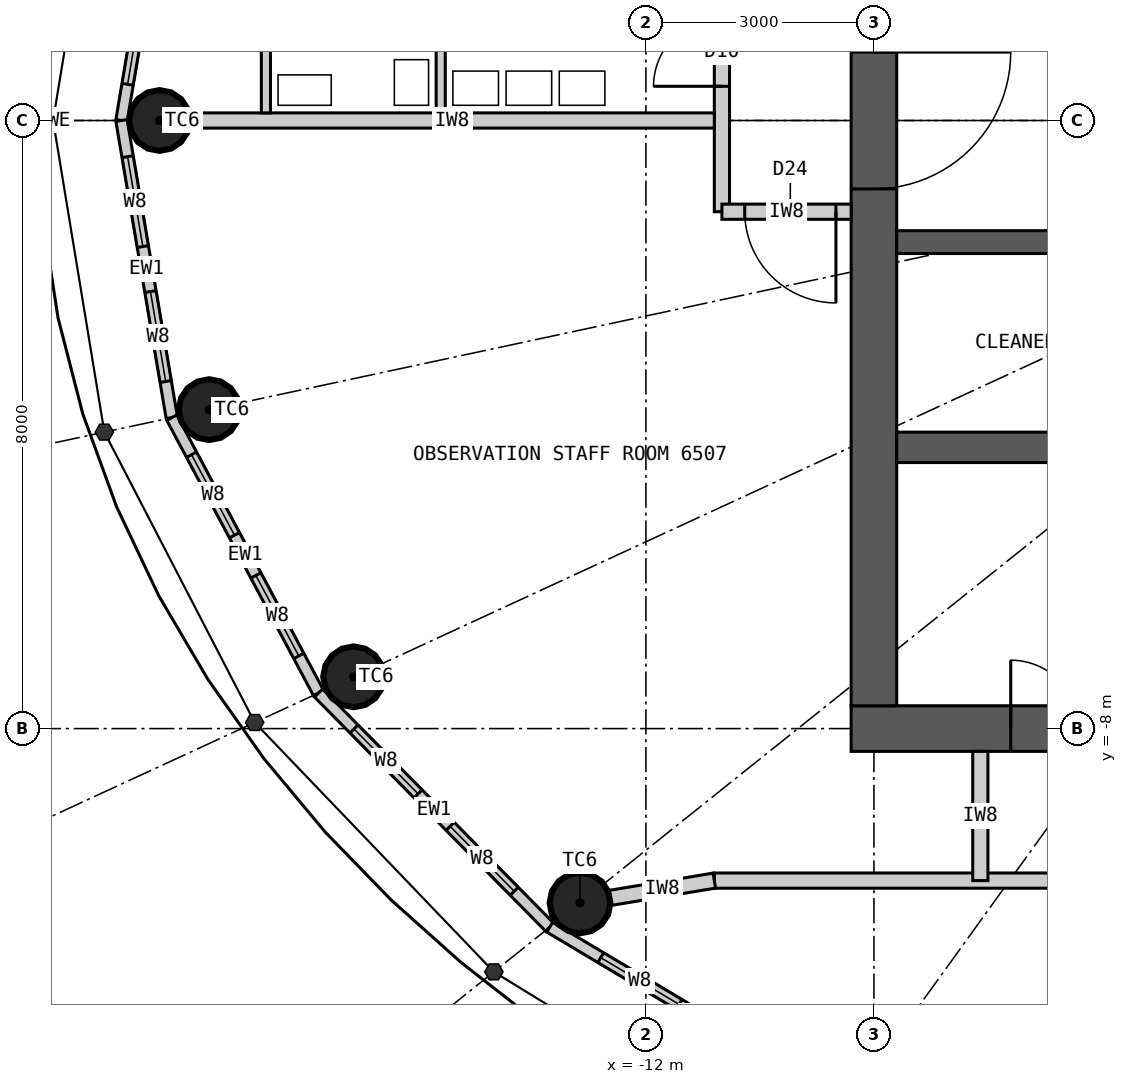
"""IFC4 building model, lengths in metres.
Left out: names, types, materials, properties, quantities, classifications, styles, units other than length and angle.
Written with IfcOpenShell. Run it as: python <this file> out.ifc"""

import sys

from ifc_helpers import new_model, si_unit, direction, frame, frame_2d, origin, origin_2d, place, context, subcontext, project, spatial, rectangle, circle, extrude, element, fill, save


model = new_model("IFC4")
c1 = context("Model", 3, precision=1e-05, world=origin(), true_north=direction((0.0, 1.0)))
c2 = subcontext(c1, "Body", "Model", "MODEL_VIEW")
j1 = project(units=[si_unit("LENGTHUNIT", "METRE"), si_unit("PLANEANGLEUNIT", "RADIAN")], contexts=[c1])
p1 = place(None, origin())
s1 = spatial("IfcSite", under=j1, at=p1, CompositionType="ELEMENT")
p2 = place(p1, origin())
s2 = spatial("IfcBuilding", under=s1, at=p2, CompositionType="ELEMENT")
p3 = place(p2, frame((0.0, 0.0, 242.7)))
s3 = spatial("IfcBuildingStorey", under=s2, at=p3, CompositionType="ELEMENT", Elevation=242.7)
for number, where, z_axis, x_axis in (
    (1, (-18.4, 0.0, 0.0), (0.0, 0.0, 1.0), (1.0, 0.0, 0.0)),
    (2, (-17.746, -3.804, 0.0), (0.0, 0.0, 1.0), (1.0, 0.0, 0.0)),
    (3, (-15.846, -7.319, 0.0), (0.0, 0.0, 1.0), (1.0, 0.0, 0.0)),
    (4, (-12.867, -10.294, 0.0), (0.0, 0.0, 1.0), (1.0, 0.0, 0.0)),
):
    element("IfcColumn", number, at=place(p3, frame(where, z_axis=z_axis, x_axis=x_axis)), inside=s3, PredefinedType="COLUMN", context=c2, shape_type="SweptSolid", body=[
        extrude(circle(Radius=0.4, at=origin_2d()), origin(), (0.0, 0.0, 1.0), 6.0),
    ])
p4 = place(p3, frame((9.3, -8.0, 0.0), z_axis=(0.0, 0.0, 1.0), x_axis=(-1.0, 0.0, 0.0)))
e5 = element("IfcWall", 5, at=p4, inside=s3, PredefinedType="SHEAR", context=c2, shape_type="SweptSolid", body=[
    extrude(rectangle(XDim=18.6, YDim=0.6, at=frame_2d((9.3, 0.0))), origin(), (0.0, 0.0, 1.0), 6.0),
])
p5 = place(p4, frame((8.0, 0.0, 0.0)))
e6 = element("IfcOpeningElement", 6, at=p5, cuts=e5, PredefinedType="OPENING", context=c2, shape_type="SweptSolid", body=[
    extrude(rectangle(XDim=1.2, YDim=2.2, at=frame_2d((0.6, 1.1))), frame((0.0, 0.31, 0.0), z_axis=(0.0, -1.0, 0.0), x_axis=(1.0, 0.0, 0.0)), (0.0, 0.0, 1.0), 0.62),
])
p6 = place(p4, frame((15.6, 0.0, 0.0)))
e7 = element("IfcOpeningElement", 7, at=p6, cuts=e5, PredefinedType="OPENING", context=c2, shape_type="SweptSolid", body=[
    extrude(rectangle(XDim=0.9, YDim=2.2, at=frame_2d((0.45, 1.1))), frame((0.0, 0.31, 0.0), z_axis=(0.0, -1.0, 0.0), x_axis=(1.0, 0.0, 0.0)), (0.0, 0.0, 1.0), 0.62),
])
p7 = place(p3, frame((-9.0, 7.7, 0.0), z_axis=(0.0, 0.0, 1.0), x_axis=(0.0, -1.0, 0.0)))
e8 = element("IfcWall", 8, at=p7, inside=s3, PredefinedType="SHEAR", context=c2, shape_type="SweptSolid", body=[
    extrude(rectangle(XDim=15.4, YDim=0.6, at=frame_2d((7.7, 0.0))), origin(), (0.0, 0.0, 1.0), 6.0),
])
p8 = place(p7, frame((6.8, 0.0, 0.0)))
e9 = element("IfcOpeningElement", 9, at=p8, cuts=e8, PredefinedType="OPENING", context=c2, shape_type="SweptSolid", body=[
    extrude(rectangle(XDim=1.8, YDim=2.2, at=frame_2d((0.9, 1.1))), frame((0.0, 0.31, 0.0), z_axis=(0.0, -1.0, 0.0), x_axis=(1.0, 0.0, 0.0)), (0.0, 0.0, 1.0), 0.62),
])
p9 = place(p3, frame((-8.7, -4.3, 0.0), z_axis=(0.0, 0.0, 1.0), x_axis=(1.0, 0.0, 0.0)))
e10 = element("IfcWall", 10, at=p9, inside=s3, PredefinedType="SHEAR", context=c2, shape_type="SweptSolid", body=[
    extrude(rectangle(XDim=17.4, YDim=0.4, at=frame_2d((8.7, 0.0))), origin(), (0.0, 0.0, 1.0), 6.0),
])
p10 = place(p3, frame((-8.7, -1.6, 0.0), z_axis=(0.0, 0.0, 1.0), x_axis=(1.0, 0.0, 0.0)))
e11 = element("IfcWall", 11, at=p10, inside=s3, PredefinedType="SHEAR", context=c2, shape_type="SweptSolid", body=[
    extrude(rectangle(XDim=17.4, YDim=0.3, at=frame_2d((8.7, 0.0))), origin(), (0.0, 0.0, 1.0), 6.0),
])
p11 = place(p10, frame((12.4, 0.0, 0.0)))
e12 = element("IfcOpeningElement", 12, at=p11, cuts=e11, PredefinedType="OPENING", context=c2, shape_type="SweptSolid", body=[
    extrude(rectangle(XDim=1.6, YDim=2.4, at=frame_2d((0.8, 1.2))), frame((0.0, 0.16, 0.0), z_axis=(0.0, -1.0, 0.0), x_axis=(1.0, 0.0, 0.0)), (0.0, 0.0, 1.0), 0.32),
])
p12 = place(p10, frame((15.5, 0.0, 0.0)))
e13 = element("IfcOpeningElement", 13, at=p12, cuts=e11, PredefinedType="OPENING", context=c2, shape_type="SweptSolid", body=[
    extrude(rectangle(XDim=1.4, YDim=2.4, at=frame_2d((0.7, 1.2))), frame((0.0, 0.16, 0.0), z_axis=(0.0, -1.0, 0.0), x_axis=(1.0, 0.0, 0.0)), (0.0, 0.0, 1.0), 0.32),
])
p13 = place(p10, frame((2.25, 0.0, 0.0)))
e14 = element("IfcOpeningElement", 14, at=p13, cuts=e11, PredefinedType="OPENING", context=c2, shape_type="SweptSolid", body=[
    extrude(rectangle(XDim=0.9, YDim=2.2, at=frame_2d((0.45, 1.1))), frame((0.0, 0.16, 0.0), z_axis=(0.0, -1.0, 0.0), x_axis=(1.0, 0.0, 0.0)), (0.0, 0.0, 1.0), 0.32),
])
p14 = place(p10, frame((8.25, 0.0, 0.0)))
e15 = element("IfcOpeningElement", 15, at=p14, cuts=e11, PredefinedType="OPENING", context=c2, shape_type="SweptSolid", body=[
    extrude(rectangle(XDim=0.9, YDim=2.2, at=frame_2d((0.45, 1.1))), frame((0.0, 0.16, 0.0), z_axis=(0.0, -1.0, 0.0), x_axis=(1.0, 0.0, 0.0)), (0.0, 0.0, 1.0), 0.32),
])
p15 = place(p3, frame((-18.238, 3.909, 0.0), z_axis=(0.0, 0.0, 1.0), x_axis=(-0.166984464914, -0.985959526795, 0.0)))
e16 = element("IfcWall", 16, at=p15, inside=s3, PredefinedType="ELEMENTEDWALL", context=c2, shape_type="SweptSolid", body=[
    extrude(rectangle(XDim=3.965, YDim=0.15, at=frame_2d((1.982, 0.0))), origin(), (0.0, 0.0, 1.0), 5.7),
])
p16 = place(p15, frame((0.483, 0.0, 0.5)))
e17 = element("IfcOpeningElement", 17, at=p16, cuts=e16, PredefinedType="OPENING", context=c2, shape_type="SweptSolid", body=[
    extrude(rectangle(XDim=1.2, YDim=4.2, at=frame_2d((0.6, 2.1))), frame((0.0, 0.085, 0.0), z_axis=(0.0, -1.0, 0.0), x_axis=(1.0, 0.0, 0.0)), (0.0, 0.0, 1.0), 0.17),
])
p17 = place(p15, frame((2.282, 0.0, 0.5)))
e18 = element("IfcOpeningElement", 18, at=p17, cuts=e16, PredefinedType="OPENING", context=c2, shape_type="SweptSolid", body=[
    extrude(rectangle(XDim=1.2, YDim=4.2, at=frame_2d((0.6, 2.1))), frame((0.0, 0.085, 0.0), z_axis=(0.0, -1.0, 0.0), x_axis=(1.0, 0.0, 0.0)), (0.0, 0.0, 1.0), 0.17),
])
p18 = place(p3, frame((-18.9, 0.0, 0.0), z_axis=(0.0, 0.0, 1.0), x_axis=(0.166984464914, -0.985959526795, 0.0)))
e19 = element("IfcWall", 19, at=p18, inside=s3, PredefinedType="ELEMENTEDWALL", context=c2, shape_type="SweptSolid", body=[
    extrude(rectangle(XDim=3.965, YDim=0.15, at=frame_2d((1.982, 0.0))), origin(), (0.0, 0.0, 1.0), 5.7),
])
p19 = place(p18, frame((0.483, 0.0, 0.5)))
e20 = element("IfcOpeningElement", 20, at=p19, cuts=e19, PredefinedType="OPENING", context=c2, shape_type="SweptSolid", body=[
    extrude(rectangle(XDim=1.2, YDim=4.2, at=frame_2d((0.6, 2.1))), frame((0.0, 0.085, 0.0), z_axis=(0.0, -1.0, 0.0), x_axis=(1.0, 0.0, 0.0)), (0.0, 0.0, 1.0), 0.17),
])
p20 = place(p18, frame((2.282, 0.0, 0.5)))
e21 = element("IfcOpeningElement", 21, at=p20, cuts=e19, PredefinedType="OPENING", context=c2, shape_type="SweptSolid", body=[
    extrude(rectangle(XDim=1.2, YDim=4.2, at=frame_2d((0.6, 2.1))), frame((0.0, 0.085, 0.0), z_axis=(0.0, -1.0, 0.0), x_axis=(1.0, 0.0, 0.0)), (0.0, 0.0, 1.0), 0.17),
])
p21 = place(p3, frame((-18.238, -3.909, 0.0), z_axis=(0.0, 0.0, 1.0), x_axis=(0.470282591286, -0.882515883332, 0.0)))
e22 = element("IfcWall", 22, at=p21, inside=s3, PredefinedType="ELEMENTEDWALL", context=c2, shape_type="SweptSolid", body=[
    extrude(rectangle(XDim=4.105, YDim=0.15, at=frame_2d((2.052, 0.0))), origin(), (0.0, 0.0, 1.0), 5.7),
])
p22 = place(p21, frame((0.552, 0.0, 0.5)))
e23 = element("IfcOpeningElement", 23, at=p22, cuts=e22, PredefinedType="OPENING", context=c2, shape_type="SweptSolid", body=[
    extrude(rectangle(XDim=1.2, YDim=4.2, at=frame_2d((0.6, 2.1))), frame((0.0, 0.085, 0.0), z_axis=(0.0, -1.0, 0.0), x_axis=(1.0, 0.0, 0.0)), (0.0, 0.0, 1.0), 0.17),
])
p23 = place(p21, frame((2.353, 0.0, 0.5)))
e24 = element("IfcOpeningElement", 24, at=p23, cuts=e22, PredefinedType="OPENING", context=c2, shape_type="SweptSolid", body=[
    extrude(rectangle(XDim=1.2, YDim=4.2, at=frame_2d((0.6, 2.1))), frame((0.0, 0.085, 0.0), z_axis=(0.0, -1.0, 0.0), x_axis=(1.0, 0.0, 0.0)), (0.0, 0.0, 1.0), 0.17),
])
p24 = place(p3, frame((-16.307, -7.532, 0.0), z_axis=(0.0, 0.0, 1.0), x_axis=(0.702523956258, -0.711660095048, 0.0)))
e25 = element("IfcWall", 25, at=p24, inside=s3, PredefinedType="ELEMENTEDWALL", context=c2, shape_type="SweptSolid", body=[
    extrude(rectangle(XDim=4.329, YDim=0.15, at=frame_2d((2.165, 0.0))), origin(), (0.0, 0.0, 1.0), 5.7),
])
p25 = place(p24, frame((0.665, 0.0, 0.5)))
e26 = element("IfcOpeningElement", 26, at=p25, cuts=e25, PredefinedType="OPENING", context=c2, shape_type="SweptSolid", body=[
    extrude(rectangle(XDim=1.2, YDim=4.2, at=frame_2d((0.6, 2.1))), frame((0.0, 0.085, 0.0), z_axis=(0.0, -1.0, 0.0), x_axis=(1.0, 0.0, 0.0)), (0.0, 0.0, 1.0), 0.17),
])
p26 = place(p24, frame((2.465, 0.0, 0.5)))
e27 = element("IfcOpeningElement", 27, at=p26, cuts=e25, PredefinedType="OPENING", context=c2, shape_type="SweptSolid", body=[
    extrude(rectangle(XDim=1.2, YDim=4.2, at=frame_2d((0.6, 2.1))), frame((0.0, 0.085, 0.0), z_axis=(0.0, -1.0, 0.0), x_axis=(1.0, 0.0, 0.0)), (0.0, 0.0, 1.0), 0.17),
])
p27 = place(p3, frame((-13.266, -10.613, 0.0), z_axis=(0.0, 0.0, 1.0), x_axis=(0.858849230109, -0.512228464594, 0.0)))
e28 = element("IfcWall", 28, at=p27, inside=s3, PredefinedType="ELEMENTEDWALL", context=c2, shape_type="SweptSolid", body=[
    extrude(rectangle(XDim=4.564, YDim=0.15, at=frame_2d((2.282, 0.0))), origin(), (0.0, 0.0, 1.0), 5.7),
])
p28 = place(p27, frame((0.782, 0.0, 0.5)))
e29 = element("IfcOpeningElement", 29, at=p28, cuts=e28, PredefinedType="OPENING", context=c2, shape_type="SweptSolid", body=[
    extrude(rectangle(XDim=1.2, YDim=4.2, at=frame_2d((0.6, 2.1))), frame((0.0, 0.085, 0.0), z_axis=(0.0, -1.0, 0.0), x_axis=(1.0, 0.0, 0.0)), (0.0, 0.0, 1.0), 0.17),
])
p29 = place(p27, frame((2.582, 0.0, 0.5)))
e30 = element("IfcOpeningElement", 30, at=p29, cuts=e28, PredefinedType="OPENING", context=c2, shape_type="SweptSolid", body=[
    extrude(rectangle(XDim=1.2, YDim=4.2, at=frame_2d((0.6, 2.1))), frame((0.0, 0.085, 0.0), z_axis=(0.0, -1.0, 0.0), x_axis=(1.0, 0.0, 0.0)), (0.0, 0.0, 1.0), 0.17),
])
p30 = place(p3, frame((11.1, -10.0, 0.0), z_axis=(0.0, 0.0, 1.0), x_axis=(-1.0, 0.0, 0.0)))
e31 = element("IfcWall", 31, at=p30, inside=s3, PredefinedType="PARTITIONING", context=c2, shape_type="SweptSolid", body=[
    extrude(rectangle(XDim=22.2, YDim=0.2, at=frame_2d((11.1, 0.0))), origin(), (0.0, 0.0, 1.0), 5.7),
])
p31 = place(p30, frame((4.65, 0.0, 0.0)))
e32 = element("IfcOpeningElement", 32, at=p31, cuts=e31, PredefinedType="OPENING", context=c2, shape_type="SweptSolid", body=[
    extrude(rectangle(XDim=1.8, YDim=2.4, at=frame_2d((0.9, 1.2))), frame((0.0, 0.11, 0.0), z_axis=(0.0, -1.0, 0.0), x_axis=(1.0, 0.0, 0.0)), (0.0, 0.0, 1.0), 0.22),
])
p32 = place(p30, frame((15.75, 0.0, 0.0)))
e33 = element("IfcOpeningElement", 33, at=p32, cuts=e31, PredefinedType="OPENING", context=c2, shape_type="SweptSolid", body=[
    extrude(rectangle(XDim=1.8, YDim=2.4, at=frame_2d((0.9, 1.2))), frame((0.0, 0.11, 0.0), z_axis=(0.0, -1.0, 0.0), x_axis=(1.0, 0.0, 0.0)), (0.0, 0.0, 1.0), 0.22),
])
p33 = place(p3, frame((-11.0, 9.9, 0.0), z_axis=(0.0, 0.0, 1.0), x_axis=(0.0, -1.0, 0.0)))
e34 = element("IfcWall", 34, at=p33, inside=s3, PredefinedType="PARTITIONING", context=c2, shape_type="SweptSolid", body=[
    extrude(rectangle(XDim=11.1, YDim=0.2, at=frame_2d((5.55, 0.0))), origin(), (0.0, 0.0, 1.0), 5.7),
])
p34 = place(p33, frame((1.45, 0.0, 0.0)))
e35 = element("IfcOpeningElement", 35, at=p34, cuts=e34, PredefinedType="OPENING", context=c2, shape_type="SweptSolid", body=[
    extrude(rectangle(XDim=1.2, YDim=2.2, at=frame_2d((0.6, 1.1))), frame((0.0, 0.11, 0.0), z_axis=(0.0, -1.0, 0.0), x_axis=(1.0, 0.0, 0.0)), (0.0, 0.0, 1.0), 0.22),
])
p35 = place(p33, frame((8.55, 0.0, 0.0)))
e36 = element("IfcOpeningElement", 36, at=p35, cuts=e34, PredefinedType="OPENING", context=c2, shape_type="SweptSolid", body=[
    extrude(rectangle(XDim=0.9, YDim=2.1, at=frame_2d((0.45, 1.05))), frame((0.0, 0.11, 0.0), z_axis=(0.0, -1.0, 0.0), x_axis=(1.0, 0.0, 0.0)), (0.0, 0.0, 1.0), 0.22),
])
p36 = place(p33, frame((5.05, 0.0, 0.0)))
e37 = element("IfcOpeningElement", 37, at=p36, cuts=e34, PredefinedType="OPENING", context=c2, shape_type="SweptSolid", body=[
    extrude(rectangle(XDim=0.9, YDim=2.1, at=frame_2d((0.45, 1.05))), frame((0.0, 0.11, 0.0), z_axis=(0.0, -1.0, 0.0), x_axis=(1.0, 0.0, 0.0)), (0.0, 0.0, 1.0), 0.22),
])
p37 = place(p3, frame((-11.1, 0.0, 0.0), z_axis=(0.0, 0.0, 1.0), x_axis=(-1.0, 0.0, 0.0)))
e38 = element("IfcWall", 38, at=p37, inside=s3, PredefinedType="PARTITIONING", context=c2, shape_type="SweptSolid", body=[
    extrude(rectangle(XDim=6.9, YDim=0.2, at=frame_2d((3.45, 0.0))), origin(), (0.0, 0.0, 1.0), 4.85),
])
p38 = place(p3, frame((-9.3, -1.2, 0.0), z_axis=(0.0, 0.0, 1.0), x_axis=(-1.0, 0.0, 0.0)))
e39 = element("IfcWall", 39, at=p38, inside=s3, PredefinedType="PARTITIONING", context=c2, shape_type="SweptSolid", body=[
    extrude(rectangle(XDim=1.7, YDim=0.2, at=frame_2d((0.85, 0.0))), origin(), (0.0, 0.0, 1.0), 5.7),
])
p39 = place(p38, frame((0.2, 0.0, 0.0)))
e40 = element("IfcOpeningElement", 40, at=p39, cuts=e39, PredefinedType="OPENING", context=c2, shape_type="SweptSolid", body=[
    extrude(rectangle(XDim=1.2, YDim=2.2, at=frame_2d((0.6, 1.1))), frame((0.0, 0.11, 0.0), z_axis=(0.0, -1.0, 0.0), x_axis=(1.0, 0.0, 0.0)), (0.0, 0.0, 1.0), 0.22),
])
p40 = place(p3, frame((-7.6, -8.3, 0.0), z_axis=(0.0, 0.0, 1.0), x_axis=(0.0, -1.0, 0.0)))
e41 = element("IfcWall", 41, at=p40, inside=s3, PredefinedType="PARTITIONING", context=c2, shape_type="SweptSolid", body=[
    extrude(rectangle(XDim=1.7, YDim=0.2, at=frame_2d((0.85, 0.0))), origin(), (0.0, 0.0, 1.0), 5.7),
])
p41 = place(p3, frame((-11.1, -10.0, 0.0), z_axis=(0.0, 0.0, 1.0), x_axis=(-0.986474439415, -0.163915162144, 0.0)))
e42 = element("IfcWall", 42, at=p41, inside=s3, PredefinedType="PARTITIONING", context=c2, shape_type="SweptSolid", body=[
    extrude(rectangle(XDim=1.391, YDim=0.2, at=frame_2d((0.696, 0.0))), origin(), (0.0, 0.0, 1.0), 4.85),
])
p42 = place(p3, frame((-14.7, 0.1, 0.0), z_axis=(0.0, 0.0, 1.0), x_axis=(0.0, 1.0, 0.0)))
e43 = element("IfcWall", 43, at=p42, inside=s3, PredefinedType="PARTITIONING", context=c2, shape_type="SweptSolid", body=[
    extrude(rectangle(XDim=7.01, YDim=0.12, at=frame_2d((3.505, 0.0))), origin(), (0.0, 0.0, 1.0), 5.7),
])
p43 = place(p3, frame((-17.0, 0.1, 0.0), z_axis=(0.0, 0.0, 1.0), x_axis=(0.0, 1.0, 0.0)))
e44 = element("IfcWall", 44, at=p43, inside=s3, PredefinedType="PARTITIONING", context=c2, shape_type="SweptSolid", body=[
    extrude(rectangle(XDim=2.41, YDim=0.12, at=frame_2d((1.205, 0.0))), origin(), (0.0, 0.0, 1.0), 5.7),
])
p44 = place(p17, origin())
e45 = element("IfcWindow", 45, at=p44, inside=s3, PartitioningType="SINGLE_PANEL", PredefinedType="WINDOW", context=c2, shape_type="SweptSolid", body=[
    extrude(rectangle(XDim=1.2, YDim=4.2, at=frame_2d((0.6, 2.1))), frame((0.0, 0.03, 0.0), z_axis=(0.0, -1.0, 0.0), x_axis=(1.0, 0.0, 0.0)), (0.0, 0.0, 1.0), 0.06),
])
fill(e18, e45)
p45 = place(p19, origin())
e46 = element("IfcWindow", 46, at=p45, inside=s3, PartitioningType="SINGLE_PANEL", PredefinedType="WINDOW", context=c2, shape_type="SweptSolid", body=[
    extrude(rectangle(XDim=1.2, YDim=4.2, at=frame_2d((0.6, 2.1))), frame((0.0, 0.03, 0.0), z_axis=(0.0, -1.0, 0.0), x_axis=(1.0, 0.0, 0.0)), (0.0, 0.0, 1.0), 0.06),
])
fill(e20, e46)
p46 = place(p20, origin())
e47 = element("IfcWindow", 47, at=p46, inside=s3, PartitioningType="SINGLE_PANEL", PredefinedType="WINDOW", context=c2, shape_type="SweptSolid", body=[
    extrude(rectangle(XDim=1.2, YDim=4.2, at=frame_2d((0.6, 2.1))), frame((0.0, 0.03, 0.0), z_axis=(0.0, -1.0, 0.0), x_axis=(1.0, 0.0, 0.0)), (0.0, 0.0, 1.0), 0.06),
])
fill(e21, e47)
p47 = place(p22, origin())
e48 = element("IfcWindow", 48, at=p47, inside=s3, PartitioningType="SINGLE_PANEL", PredefinedType="WINDOW", context=c2, shape_type="SweptSolid", body=[
    extrude(rectangle(XDim=1.2, YDim=4.2, at=frame_2d((0.6, 2.1))), frame((0.0, 0.03, 0.0), z_axis=(0.0, -1.0, 0.0), x_axis=(1.0, 0.0, 0.0)), (0.0, 0.0, 1.0), 0.06),
])
fill(e23, e48)
p48 = place(p23, origin())
e49 = element("IfcWindow", 49, at=p48, inside=s3, PartitioningType="SINGLE_PANEL", PredefinedType="WINDOW", context=c2, shape_type="SweptSolid", body=[
    extrude(rectangle(XDim=1.2, YDim=4.2, at=frame_2d((0.6, 2.1))), frame((0.0, 0.03, 0.0), z_axis=(0.0, -1.0, 0.0), x_axis=(1.0, 0.0, 0.0)), (0.0, 0.0, 1.0), 0.06),
])
fill(e24, e49)
p49 = place(p25, origin())
e50 = element("IfcWindow", 50, at=p49, inside=s3, PartitioningType="SINGLE_PANEL", PredefinedType="WINDOW", context=c2, shape_type="SweptSolid", body=[
    extrude(rectangle(XDim=1.2, YDim=4.2, at=frame_2d((0.6, 2.1))), frame((0.0, 0.03, 0.0), z_axis=(0.0, -1.0, 0.0), x_axis=(1.0, 0.0, 0.0)), (0.0, 0.0, 1.0), 0.06),
])
fill(e26, e50)
p50 = place(p26, origin())
e51 = element("IfcWindow", 51, at=p50, inside=s3, PartitioningType="SINGLE_PANEL", PredefinedType="WINDOW", context=c2, shape_type="SweptSolid", body=[
    extrude(rectangle(XDim=1.2, YDim=4.2, at=frame_2d((0.6, 2.1))), frame((0.0, 0.03, 0.0), z_axis=(0.0, -1.0, 0.0), x_axis=(1.0, 0.0, 0.0)), (0.0, 0.0, 1.0), 0.06),
])
fill(e27, e51)
p51 = place(p28, origin())
e52 = element("IfcWindow", 52, at=p51, inside=s3, PartitioningType="SINGLE_PANEL", PredefinedType="WINDOW", context=c2, shape_type="SweptSolid", body=[
    extrude(rectangle(XDim=1.2, YDim=4.2, at=frame_2d((0.6, 2.1))), frame((0.0, 0.03, 0.0), z_axis=(0.0, -1.0, 0.0), x_axis=(1.0, 0.0, 0.0)), (0.0, 0.0, 1.0), 0.06),
])
fill(e29, e52)
p52 = place(p39, origin())
e53 = element("IfcDoor", 53, at=p52, inside=s3, OperationType="SINGLE_SWING_LEFT", PredefinedType="DOOR", context=c2, shape_type="SweptSolid", body=[
    extrude(rectangle(XDim=1.2, YDim=2.2, at=frame_2d((0.6, 1.1))), frame((0.0, 0.025, 0.0), z_axis=(0.0, -1.0, 0.0), x_axis=(1.0, 0.0, 0.0)), (0.0, 0.0, 1.0), 0.05),
])
fill(e40, e53)
p53 = place(p35, origin())
e54 = element("IfcDoor", 54, at=p53, inside=s3, OperationType="SINGLE_SWING_RIGHT", PredefinedType="DOOR", context=c2, shape_type="SweptSolid", body=[
    extrude(rectangle(XDim=0.9, YDim=2.1, at=frame_2d((0.45, 1.05))), frame((0.0, 0.025, 0.0), z_axis=(0.0, -1.0, 0.0), x_axis=(1.0, 0.0, 0.0)), (0.0, 0.0, 1.0), 0.05),
])
fill(e36, e54)
p54 = place(p6, origin())
e55 = element("IfcDoor", 55, at=p54, inside=s3, OperationType="SINGLE_SWING_RIGHT", PredefinedType="DOOR", context=c2, shape_type="SweptSolid", body=[
    extrude(rectangle(XDim=0.9, YDim=2.2, at=frame_2d((0.45, 1.1))), frame((0.0, 0.025, 0.0), z_axis=(0.0, -1.0, 0.0), x_axis=(1.0, 0.0, 0.0)), (0.0, 0.0, 1.0), 0.05),
])
fill(e7, e55)
p55 = place(p8, origin())
e56 = element("IfcDoor", 56, at=p55, inside=s3, OperationType="DOUBLE_DOOR_DOUBLE_SWING", PredefinedType="DOOR", context=c2, shape_type="SweptSolid", body=[
    extrude(rectangle(XDim=1.8, YDim=2.2, at=frame_2d((0.9, 1.1))), frame((0.0, 0.025, 0.0), z_axis=(0.0, -1.0, 0.0), x_axis=(1.0, 0.0, 0.0)), (0.0, 0.0, 1.0), 0.05),
])
fill(e9, e56)
save(model, sys.argv[1])
